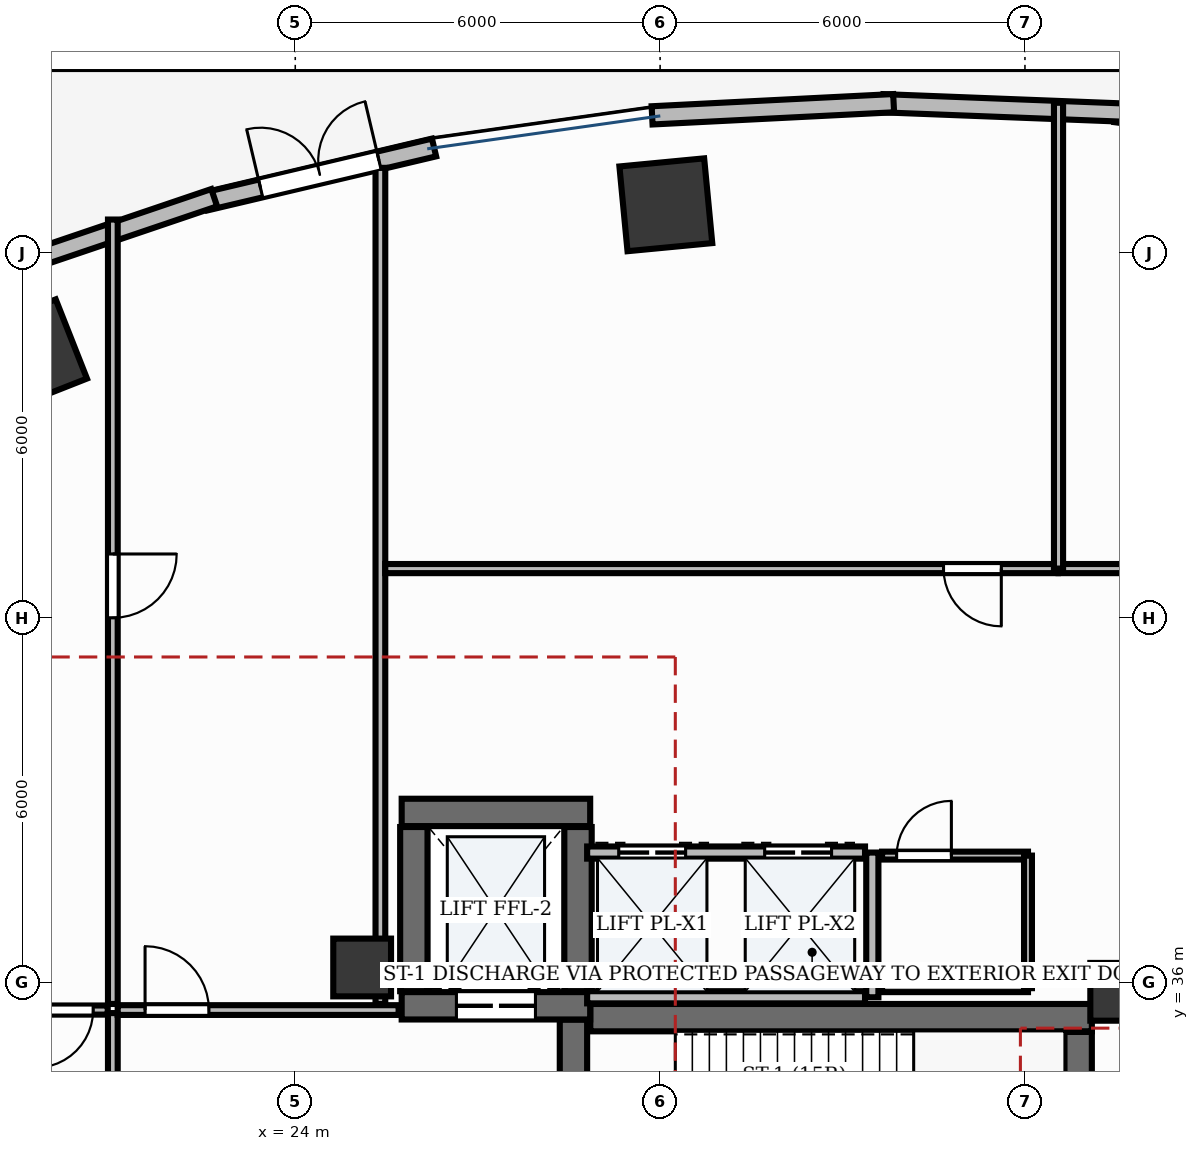
"""IFC4 building model, lengths in metres.
Left out: names, types, materials, properties, quantities, classifications, styles, units other than length and angle.
Written with IfcOpenShell. Run it as: python <this file> out.ifc"""

import sys

from ifc_helpers import new_model, si_unit, direction, frame, frame_2d, origin, origin_2d, place, context, subcontext, project, spatial, rectangle, extrude, element, fill, save


model = new_model("IFC4")
c1 = context("Model", 3, precision=1e-05, world=origin(), true_north=direction((0.0, 1.0)))
c2 = subcontext(c1, "Body", "Model", "MODEL_VIEW")
j1 = project(units=[si_unit("LENGTHUNIT", "METRE"), si_unit("PLANEANGLEUNIT", "RADIAN")], contexts=[c1])
p1 = place(None, origin())
s1 = spatial("IfcSite", under=j1, at=p1, CompositionType="ELEMENT")
p2 = place(p1, origin())
s2 = spatial("IfcBuilding", under=s1, at=p2, CompositionType="ELEMENT")
p3 = place(p2, origin())
s3 = spatial("IfcBuildingStorey", under=s2, at=p3, CompositionType="ELEMENT", Elevation=0.0)
p4 = place(p3, frame((28.852, 35.425, 0.0), z_axis=(0.0, 0.0, 1.0), x_axis=(1.0, 0.0, 0.0)))
e1 = element("IfcWall", 1, at=p4, inside=s3, PredefinedType="SHEAR", context=c2, shape_type="SweptSolid", body=[
    extrude(rectangle(XDim=8.248, YDim=0.45, at=frame_2d((4.124, 0.0))), origin(), (0.0, 0.0, 1.0), 5.1),
])
p5 = place(p3, frame((36.875, 32.11, 0.0), z_axis=(0.0, 0.0, 1.0), x_axis=(0.0, 1.0, 0.0)))
e2 = element("IfcWall", 2, at=p5, inside=s3, PredefinedType="SHEAR", context=c2, shape_type="SweptSolid", body=[
    extrude(rectangle(XDim=3.08, YDim=0.45, at=frame_2d((1.54, 0.0))), origin(), (0.0, 0.0, 1.0), 5.1),
])
p6 = place(p3, frame((28.575, 32.11, 0.0), z_axis=(0.0, 0.0, 1.0), x_axis=(0.0, 1.0, 0.0)))
e3 = element("IfcWall", 3, at=p6, inside=s3, PredefinedType="SHEAR", context=c2, shape_type="SweptSolid", body=[
    extrude(rectangle(XDim=3.283, YDim=0.45, at=frame_2d((1.642, 0.0))), origin(), (0.0, 0.0, 1.0), 5.1),
])
p7 = place(p6, frame((0.2, 0.0, 0.0)))
e4 = element("IfcOpeningElement", 4, at=p7, cuts=e3, PredefinedType="OPENING", context=c2, shape_type="SweptSolid", body=[
    extrude(rectangle(XDim=1.05, YDim=2.15, at=frame_2d((0.525, 1.075))), frame((0.0, 0.24, 0.0), z_axis=(0.0, -1.0, 0.0), x_axis=(1.0, 0.0, 0.0)), (0.0, 0.0, 1.0), 0.48),
])
p8 = place(p3, frame((25.75, 38.8, 0.0), z_axis=(0.0, 0.0, 1.0), x_axis=(1.0, 0.0, 0.0)))
e5 = element("IfcWall", 5, at=p8, inside=s3, PredefinedType="SHEAR", context=c2, shape_type="SweptSolid", body=[
    extrude(rectangle(XDim=3.1, YDim=0.45, at=frame_2d((1.55, 0.0))), origin(), (0.0, 0.0, 1.0), 5.1),
])
p9 = place(p3, frame((25.75, 35.62, 0.0), z_axis=(0.0, 0.0, 1.0), x_axis=(1.0, 0.0, 0.0)))
e6 = element("IfcWall", 6, at=p9, inside=s3, PredefinedType="SHEAR", context=c2, shape_type="SweptSolid", body=[
    extrude(rectangle(XDim=3.1, YDim=0.45, at=frame_2d((1.55, 0.0))), origin(), (0.0, 0.0, 1.0), 5.1),
])
p10 = place(p9, frame((0.9, 0.0, 0.0)))
e7 = element("IfcOpeningElement", 7, at=p10, cuts=e6, PredefinedType="OPENING", context=c2, shape_type="SweptSolid", body=[
    extrude(rectangle(XDim=1.3, YDim=2.2, at=frame_2d((0.65, 1.1))), frame((0.0, 0.24, 0.0), z_axis=(0.0, -1.0, 0.0), x_axis=(1.0, 0.0, 0.0)), (0.0, 0.0, 1.0), 0.48),
])
for number, where, z_axis, x_axis in (
    (8, (25.95, 35.86, 0.0), (0.0, 0.0, 1.0), (0.0, 1.0, 0.0)),
    (9, (28.65, 35.86, 0.0), (0.0, 0.0, 1.0), (0.0, 1.0, 0.0)),
):
    element("IfcWall", number, at=place(p3, frame(where, z_axis=z_axis, x_axis=x_axis)), inside=s3, PredefinedType="SHEAR", context=c2, shape_type="SweptSolid", body=[
        extrude(rectangle(XDim=2.7, YDim=0.45, at=frame_2d((1.35, 0.0))), origin(), (0.0, 0.0, 1.0), 5.1),
    ])
for number, where, z_axis, x_axis in (
    (10, (37.55, 35.85, -0.0), (0.0, 0.0, 1.0), (1.0, 0.0, 0.0)),
    (11, (25.1, 36.25, -0.0), (0.0, 0.0, 1.0), (1.0, 0.0, 0.0)),
):
    element("IfcColumn", number, at=place(p3, frame(where, z_axis=z_axis, x_axis=x_axis)), inside=s3, PredefinedType="PILASTER", context=c2, shape_type="SweptSolid", body=[
        extrude(rectangle(XDim=0.95, YDim=0.95, at=origin_2d()), origin(), (0.0, 0.0, 1.0), 5.101),
    ])
for number, where, z_axis, x_axis in (
    (12, (30.094, 48.792, -0.0), (0.0, 0.0, 1.0), (0.995, 0.095, 0.0)),
    (13, (19.667, 46.329, -0.0), (0.0, 0.0, 1.0), (0.93, 0.367, 0.0)),
):
    element("IfcColumn", number, at=place(p3, frame(where, z_axis=z_axis, x_axis=x_axis)), inside=s3, PredefinedType="COLUMN", context=c2, shape_type="SweptSolid", body=[
        extrude(rectangle(XDim=1.4, YDim=1.4, at=origin_2d()), origin(), (0.0, 0.0, 1.0), 5.101),
    ])
p11 = place(p3, frame((41.373, 49.798, 0.0), z_axis=(0.0, 0.0, 1.0), x_axis=(-0.991741322416, 0.128254237408, 0.0)))
e14 = element("IfcWall", 14, at=p11, inside=s3, PredefinedType="STANDARD", context=c2, shape_type="SweptSolid", body=[
    extrude(rectangle(XDim=3.916, YDim=0.3, at=frame_2d((1.958, 0.0))), origin(), (0.0, 0.0, 1.0), 5.1),
])
p12 = place(p11, frame((0.758, 0.0, 1.5)))
e15 = element("IfcOpeningElement", 15, at=p12, cuts=e14, PredefinedType="OPENING", context=c2, shape_type="SweptSolid", body=[
    extrude(rectangle(XDim=2.4, YDim=1.2, at=frame_2d((1.2, 0.6))), frame((0.0, 0.165, 0.0), z_axis=(0.0, -1.0, 0.0), x_axis=(1.0, 0.0, 0.0)), (0.0, 0.0, 1.0), 0.33),
])
p13 = place(p3, frame((22.525, 48.847, 0.0), z_axis=(0.0, 0.0, 1.0), x_axis=(0.973186156802, 0.230018921417, 0.0)))
e16 = element("IfcWall", 16, at=p13, inside=s3, PredefinedType="STANDARD", context=c2, shape_type="SweptSolid", body=[
    extrude(rectangle(XDim=3.861, YDim=0.3, at=frame_2d((1.931, 0.0))), origin(), (0.0, 0.0, 1.0), 5.1),
])
p14 = place(p13, frame((0.931, 0.0, 0.0)))
e17 = element("IfcOpeningElement", 17, at=p14, cuts=e16, PredefinedType="OPENING", context=c2, shape_type="SweptSolid", body=[
    extrude(rectangle(XDim=2.0, YDim=2.3, at=frame_2d((1.0, 1.15))), frame((0.0, 0.165, 0.0), z_axis=(0.0, -1.0, 0.0), x_axis=(1.0, 0.0, 0.0)), (0.0, 0.0, 1.0), 0.33),
])
p15 = place(p3, frame((37.644, 50.308, 0.0), z_axis=(0.0, 0.0, 1.0), x_axis=(-0.999245411623, 0.038840794937, 0.0)))
e18 = element("IfcWall", 18, at=p15, inside=s3, PredefinedType="STANDARD", context=c2, shape_type="SweptSolid", body=[
    extrude(rectangle(XDim=3.979, YDim=0.3, at=frame_2d((1.989, 0.0))), origin(), (0.0, 0.0, 1.0), 5.1),
])
p16 = place(p3, frame((33.84, 50.463, 0.0), z_axis=(0.0, 0.0, 1.0), x_axis=(-0.998732359232, -0.050335619826, 0.0)))
e19 = element("IfcWall", 19, at=p16, inside=s3, PredefinedType="STANDARD", context=c2, shape_type="SweptSolid", body=[
    extrude(rectangle(XDim=3.977, YDim=0.3, at=frame_2d((1.989, 0.0))), origin(), (0.0, 0.0, 1.0), 5.1),
])
p17 = place(p3, frame((22.667, 48.909, 0.0), z_axis=(0.0, 0.0, 1.0), x_axis=(-0.94702579403, -0.321157508773, 0.0)))
e20 = element("IfcWall", 20, at=p17, inside=s3, PredefinedType="STANDARD", context=c2, shape_type="SweptSolid", body=[
    extrude(rectangle(XDim=3.83, YDim=0.3, at=frame_2d((1.915, 0.0))), origin(), (0.0, 0.0, 1.0), 5.1),
])
p18 = place(p3, frame((33.49, 35.76, 0.0), z_axis=(0.0, 0.0, 1.0), x_axis=(0.0, 1.0, 0.0)))
e21 = element("IfcWall", 21, at=p18, inside=s3, PredefinedType="PARTITIONING", context=c2, shape_type="SweptSolid", body=[
    extrude(rectangle(XDim=2.38, YDim=0.2, at=frame_2d((1.19, 0.0))), origin(), (0.0, 0.0, 1.0), 4.11),
])
p19 = place(p3, frame((28.8, 35.76, 0.0), z_axis=(0.0, 0.0, 1.0), x_axis=(1.0, 0.0, 0.0)))
e22 = element("IfcWall", 22, at=p19, inside=s3, PredefinedType="PARTITIONING", context=c2, shape_type="SweptSolid", body=[
    extrude(rectangle(XDim=4.57, YDim=0.2, at=frame_2d((2.285, 0.0))), origin(), (0.0, 0.0, 1.0), 4.11),
])
p20 = place(p3, frame((28.8, 38.14, 0.0), z_axis=(0.0, 0.0, 1.0), x_axis=(1.0, 0.0, 0.0)))
e23 = element("IfcWall", 23, at=p20, inside=s3, PredefinedType="PARTITIONING", context=c2, shape_type="SweptSolid", body=[
    extrude(rectangle(XDim=4.57, YDim=0.2, at=frame_2d((2.285, 0.0))), origin(), (0.0, 0.0, 1.0), 4.11),
])
p21 = place(p20, frame((0.52, 0.0, 0.0)))
e24 = element("IfcOpeningElement", 24, at=p21, cuts=e23, PredefinedType="OPENING", context=c2, shape_type="SweptSolid", body=[
    extrude(rectangle(XDim=1.1, YDim=2.2, at=frame_2d((0.55, 1.1))), frame((0.0, 0.115, 0.0), z_axis=(0.0, -1.0, 0.0), x_axis=(1.0, 0.0, 0.0)), (0.0, 0.0, 1.0), 0.23),
])
p22 = place(p20, frame((2.92, 0.0, 0.0)))
e25 = element("IfcOpeningElement", 25, at=p22, cuts=e23, PredefinedType="OPENING", context=c2, shape_type="SweptSolid", body=[
    extrude(rectangle(XDim=1.1, YDim=2.2, at=frame_2d((0.55, 1.1))), frame((0.0, 0.115, 0.0), z_axis=(0.0, -1.0, 0.0), x_axis=(1.0, 0.0, 0.0)), (0.0, 0.0, 1.0), 0.23),
])
p23 = place(p3, frame((21.0, 32.1, 0.0), z_axis=(0.0, 0.0, 1.0), x_axis=(0.0, 1.0, 0.0)))
e26 = element("IfcWall", 26, at=p23, inside=s3, PredefinedType="PARTITIONING", context=c2, shape_type="SweptSolid", body=[
    extrude(rectangle(XDim=3.4, YDim=0.16, at=frame_2d((1.7, 0.0))), origin(), (0.0, 0.0, 1.0), 4.11),
])
p24 = place(p23, frame((1.175, 0.0, 0.0)))
e27 = element("IfcOpeningElement", 27, at=p24, cuts=e26, PredefinedType="OPENING", context=c2, shape_type="SweptSolid", body=[
    extrude(rectangle(XDim=1.05, YDim=2.15, at=frame_2d((0.525, 1.075))), frame((0.0, 0.095, 0.0), z_axis=(0.0, -1.0, 0.0), x_axis=(1.0, 0.0, 0.0)), (0.0, 0.0, 1.0), 0.19),
])
p25 = place(p3, frame((21.08, 35.55, 0.0), z_axis=(0.0, 0.0, 1.0), x_axis=(1.0, 0.0, 0.0)))
e28 = element("IfcWall", 28, at=p25, inside=s3, PredefinedType="PARTITIONING", context=c2, shape_type="SweptSolid", body=[
    extrude(rectangle(XDim=4.62, YDim=0.16, at=frame_2d((2.31, 0.0))), origin(), (0.0, 0.0, 1.0), 4.11),
])
p26 = place(p25, frame((0.45, 0.0, 0.0)))
e29 = element("IfcOpeningElement", 29, at=p26, cuts=e28, PredefinedType="OPENING", context=c2, shape_type="SweptSolid", body=[
    extrude(rectangle(XDim=1.05, YDim=2.15, at=frame_2d((0.525, 1.075))), frame((0.0, 0.095, 0.0), z_axis=(0.0, -1.0, 0.0), x_axis=(1.0, 0.0, 0.0)), (0.0, 0.0, 1.0), 0.19),
])
p27 = place(p3, frame((21.0, 48.55, 0.0), z_axis=(0.0, 0.0, 1.0), x_axis=(0.0, -1.0, 0.0)))
e30 = element("IfcWall", 30, at=p27, inside=s3, PredefinedType="PARTITIONING", context=c2, shape_type="SweptSolid", body=[
    extrude(rectangle(XDim=12.9, YDim=0.16, at=frame_2d((6.45, 0.0))), origin(), (0.0, 0.0, 1.0), 4.11),
])
p28 = place(p27, frame((5.5, 0.0, 0.0)))
e31 = element("IfcOpeningElement", 31, at=p28, cuts=e30, PredefinedType="OPENING", context=c2, shape_type="SweptSolid", body=[
    extrude(rectangle(XDim=1.05, YDim=2.15, at=frame_2d((0.525, 1.075))), frame((0.0, 0.095, 0.0), z_axis=(0.0, -1.0, 0.0), x_axis=(1.0, 0.0, 0.0)), (0.0, 0.0, 1.0), 0.19),
])
p29 = place(p3, frame((25.4, 35.65, 0.0), z_axis=(0.0, 0.0, 1.0), x_axis=(0.0, 1.0, 0.0)))
e32 = element("IfcWall", 32, at=p29, inside=s3, PredefinedType="PARTITIONING", context=c2, shape_type="SweptSolid", body=[
    extrude(rectangle(XDim=13.75, YDim=0.16, at=frame_2d((6.875, 0.0))), origin(), (0.0, 0.0, 1.0), 4.11),
])
p30 = place(p3, frame((33.65, 38.09, 0.0), z_axis=(0.0, 0.0, 1.0), x_axis=(1.0, 0.0, 0.0)))
e33 = element("IfcWall", 33, at=p30, inside=s3, PredefinedType="PARTITIONING", context=c2, shape_type="SweptSolid", body=[
    extrude(rectangle(XDim=2.4, YDim=0.13, at=frame_2d((1.2, 0.0))), origin(), (0.0, 0.0, 1.0), 4.11),
])
p31 = place(p30, frame((0.24, 0.0, 0.0)))
e34 = element("IfcOpeningElement", 34, at=p31, cuts=e33, PredefinedType="OPENING", context=c2, shape_type="SweptSolid", body=[
    extrude(rectangle(XDim=0.9, YDim=2.15, at=frame_2d((0.45, 1.075))), frame((0.0, 0.08, 0.0), z_axis=(0.0, -1.0, 0.0), x_axis=(1.0, 0.0, 0.0)), (0.0, 0.0, 1.0), 0.16),
])
p32 = place(p3, frame((43.2, 42.81, 0.0), z_axis=(0.0, 0.0, 1.0), x_axis=(-1.0, 0.0, 0.0)))
e35 = element("IfcWall", 35, at=p32, inside=s3, PredefinedType="PARTITIONING", context=c2, shape_type="SweptSolid", body=[
    extrude(rectangle(XDim=6.648, YDim=0.15, at=frame_2d((3.324, 0.0))), origin(), (0.0, 0.0, 1.0), 4.11),
])
p33 = place(p32, frame((0.553, 0.0, 0.0)))
e36 = element("IfcOpeningElement", 36, at=p33, cuts=e35, PredefinedType="OPENING", context=c2, shape_type="SweptSolid", body=[
    extrude(rectangle(XDim=0.95, YDim=2.15, at=frame_2d((0.475, 1.075))), frame((0.0, 0.09, 0.0), z_axis=(0.0, -1.0, 0.0), x_axis=(1.0, 0.0, 0.0)), (0.0, 0.0, 1.0), 0.18),
])
p34 = place(p3, frame((36.542, 42.81, 0.0), z_axis=(0.0, 0.0, 1.0), x_axis=(-1.0, 0.0, 0.0)))
e37 = element("IfcWall", 37, at=p34, inside=s3, PredefinedType="PARTITIONING", context=c2, shape_type="SweptSolid", body=[
    extrude(rectangle(XDim=11.062, YDim=0.15, at=frame_2d((5.531, 0.0))), origin(), (0.0, 0.0, 1.0), 4.11),
])
p35 = place(p34, frame((0.931, 0.0, 0.0)))
e38 = element("IfcOpeningElement", 38, at=p35, cuts=e37, PredefinedType="OPENING", context=c2, shape_type="SweptSolid", body=[
    extrude(rectangle(XDim=0.95, YDim=2.15, at=frame_2d((0.475, 1.075))), frame((0.0, 0.09, 0.0), z_axis=(0.0, -1.0, 0.0), x_axis=(1.0, 0.0, 0.0)), (0.0, 0.0, 1.0), 0.18),
])
p36 = place(p3, frame((20.916, 35.55, 0.0), z_axis=(0.0, 0.0, 1.0), x_axis=(-1.0, 0.0, 0.0)))
e39 = element("IfcWall", 39, at=p36, inside=s3, PredefinedType="PARTITIONING", context=c2, shape_type="SweptSolid", body=[
    extrude(rectangle(XDim=1.964, YDim=0.15, at=frame_2d((0.982, 0.0))), origin(), (0.0, 0.0, 1.0), 4.11),
])
p37 = place(p36, frame((0.24, 0.0, 0.0)))
e40 = element("IfcOpeningElement", 40, at=p37, cuts=e39, PredefinedType="OPENING", context=c2, shape_type="SweptSolid", body=[
    extrude(rectangle(XDim=0.95, YDim=2.15, at=frame_2d((0.475, 1.075))), frame((0.0, 0.09, 0.0), z_axis=(0.0, -1.0, 0.0), x_axis=(1.0, 0.0, 0.0)), (0.0, 0.0, 1.0), 0.18),
])
p38 = place(p3, frame((36.05, 35.91, 0.0), z_axis=(0.0, 0.0, 1.0), x_axis=(-1.0, 0.0, 0.0)))
e41 = element("IfcWall", 41, at=p38, inside=s3, PredefinedType="PARTITIONING", context=c2, shape_type="SweptSolid", body=[
    extrude(rectangle(XDim=2.4, YDim=0.13, at=frame_2d((1.2, 0.0))), origin(), (0.0, 0.0, 1.0), 4.11),
])
p39 = place(p3, frame((36.05, 38.09, 0.0), z_axis=(0.0, 0.0, 1.0), x_axis=(0.0, -1.0, 0.0)))
e42 = element("IfcWall", 42, at=p39, inside=s3, PredefinedType="PARTITIONING", context=c2, shape_type="SweptSolid", body=[
    extrude(rectangle(XDim=2.18, YDim=0.13, at=frame_2d((1.09, 0.0))), origin(), (0.0, 0.0, 1.0), 4.11),
])
p40 = place(p3, frame((36.552, 42.81, 0.0), z_axis=(0.0, 0.0, 1.0), x_axis=(0.0, 1.0, 0.0)))
e43 = element("IfcWall", 43, at=p40, inside=s3, PredefinedType="PARTITIONING", context=c2, shape_type="SweptSolid", body=[
    extrude(rectangle(XDim=7.66, YDim=0.15, at=frame_2d((3.83, 0.0))), origin(), (0.0, 0.0, 1.0), 4.11),
])
p41 = place(p14, origin())
e44 = element("IfcDoor", 44, at=p41, inside=s3, OperationType="DOUBLE_DOOR_SINGLE_SWING", PredefinedType="DOOR", context=c2, shape_type="SweptSolid", body=[
    extrude(rectangle(XDim=2.0, YDim=2.3, at=frame_2d((1.0, 1.15))), frame((0.0, 0.025, 0.0), z_axis=(0.0, -1.0, 0.0), x_axis=(1.0, 0.0, 0.0)), (0.0, 0.0, 1.0), 0.05),
])
fill(e17, e44)
p42 = place(p21, origin())
e45 = element("IfcDoor", 45, at=p42, inside=s3, OperationType="DOUBLE_DOOR_SLIDING", PredefinedType="DOOR", context=c2, shape_type="SweptSolid", body=[
    extrude(rectangle(XDim=1.1, YDim=2.2, at=frame_2d((0.55, 1.1))), frame((0.0, 0.025, 0.0), z_axis=(0.0, -1.0, 0.0), x_axis=(1.0, 0.0, 0.0)), (0.0, 0.0, 1.0), 0.05),
])
fill(e24, e45)
p43 = place(p22, origin())
e46 = element("IfcDoor", 46, at=p43, inside=s3, OperationType="DOUBLE_DOOR_SLIDING", PredefinedType="DOOR", context=c2, shape_type="SweptSolid", body=[
    extrude(rectangle(XDim=1.1, YDim=2.2, at=frame_2d((0.55, 1.1))), frame((0.0, 0.025, 0.0), z_axis=(0.0, -1.0, 0.0), x_axis=(1.0, 0.0, 0.0)), (0.0, 0.0, 1.0), 0.05),
])
fill(e25, e46)
p44 = place(p10, origin())
e47 = element("IfcDoor", 47, at=p44, inside=s3, OperationType="DOUBLE_DOOR_SLIDING", PredefinedType="DOOR", context=c2, shape_type="SweptSolid", body=[
    extrude(rectangle(XDim=1.3, YDim=2.2, at=frame_2d((0.65, 1.1))), frame((0.0, 0.025, 0.0), z_axis=(0.0, -1.0, 0.0), x_axis=(1.0, 0.0, 0.0)), (0.0, 0.0, 1.0), 0.05),
])
fill(e7, e47)
p45 = place(p26, origin())
e48 = element("IfcDoor", 48, at=p45, inside=s3, OperationType="SINGLE_SWING_LEFT", PredefinedType="DOOR", context=c2, shape_type="SweptSolid", body=[
    extrude(rectangle(XDim=1.05, YDim=2.15, at=frame_2d((0.525, 1.075))), frame((0.0, 0.025, 0.0), z_axis=(0.0, -1.0, 0.0), x_axis=(1.0, 0.0, 0.0)), (0.0, 0.0, 1.0), 0.05),
])
fill(e29, e48)
p46 = place(p28, origin())
e49 = element("IfcDoor", 49, at=p46, inside=s3, OperationType="SINGLE_SWING_LEFT", PredefinedType="DOOR", context=c2, shape_type="SweptSolid", body=[
    extrude(rectangle(XDim=1.05, YDim=2.15, at=frame_2d((0.525, 1.075))), frame((0.0, 0.025, 0.0), z_axis=(0.0, -1.0, 0.0), x_axis=(1.0, 0.0, 0.0)), (0.0, 0.0, 1.0), 0.05),
])
fill(e31, e49)
p47 = place(p31, origin())
e50 = element("IfcDoor", 50, at=p47, inside=s3, OperationType="SINGLE_SWING_RIGHT", PredefinedType="DOOR", context=c2, shape_type="SweptSolid", body=[
    extrude(rectangle(XDim=0.9, YDim=2.15, at=frame_2d((0.45, 1.075))), frame((0.0, 0.025, 0.0), z_axis=(0.0, -1.0, 0.0), x_axis=(1.0, 0.0, 0.0)), (0.0, 0.0, 1.0), 0.05),
])
fill(e34, e50)
p48 = place(p35, origin())
e51 = element("IfcDoor", 51, at=p48, inside=s3, OperationType="SINGLE_SWING_LEFT", PredefinedType="DOOR", context=c2, shape_type="SweptSolid", body=[
    extrude(rectangle(XDim=0.95, YDim=2.15, at=frame_2d((0.475, 1.075))), frame((0.0, 0.025, 0.0), z_axis=(0.0, -1.0, 0.0), x_axis=(1.0, 0.0, 0.0)), (0.0, 0.0, 1.0), 0.05),
])
fill(e38, e51)
p49 = place(p37, origin())
e52 = element("IfcDoor", 52, at=p49, inside=s3, OperationType="SINGLE_SWING_RIGHT", PredefinedType="DOOR", context=c2, shape_type="SweptSolid", body=[
    extrude(rectangle(XDim=0.95, YDim=2.15, at=frame_2d((0.475, 1.075))), frame((0.0, 0.025, 0.0), z_axis=(0.0, -1.0, 0.0), x_axis=(1.0, 0.0, 0.0)), (0.0, 0.0, 1.0), 0.05),
])
fill(e40, e52)
save(model, sys.argv[1])
